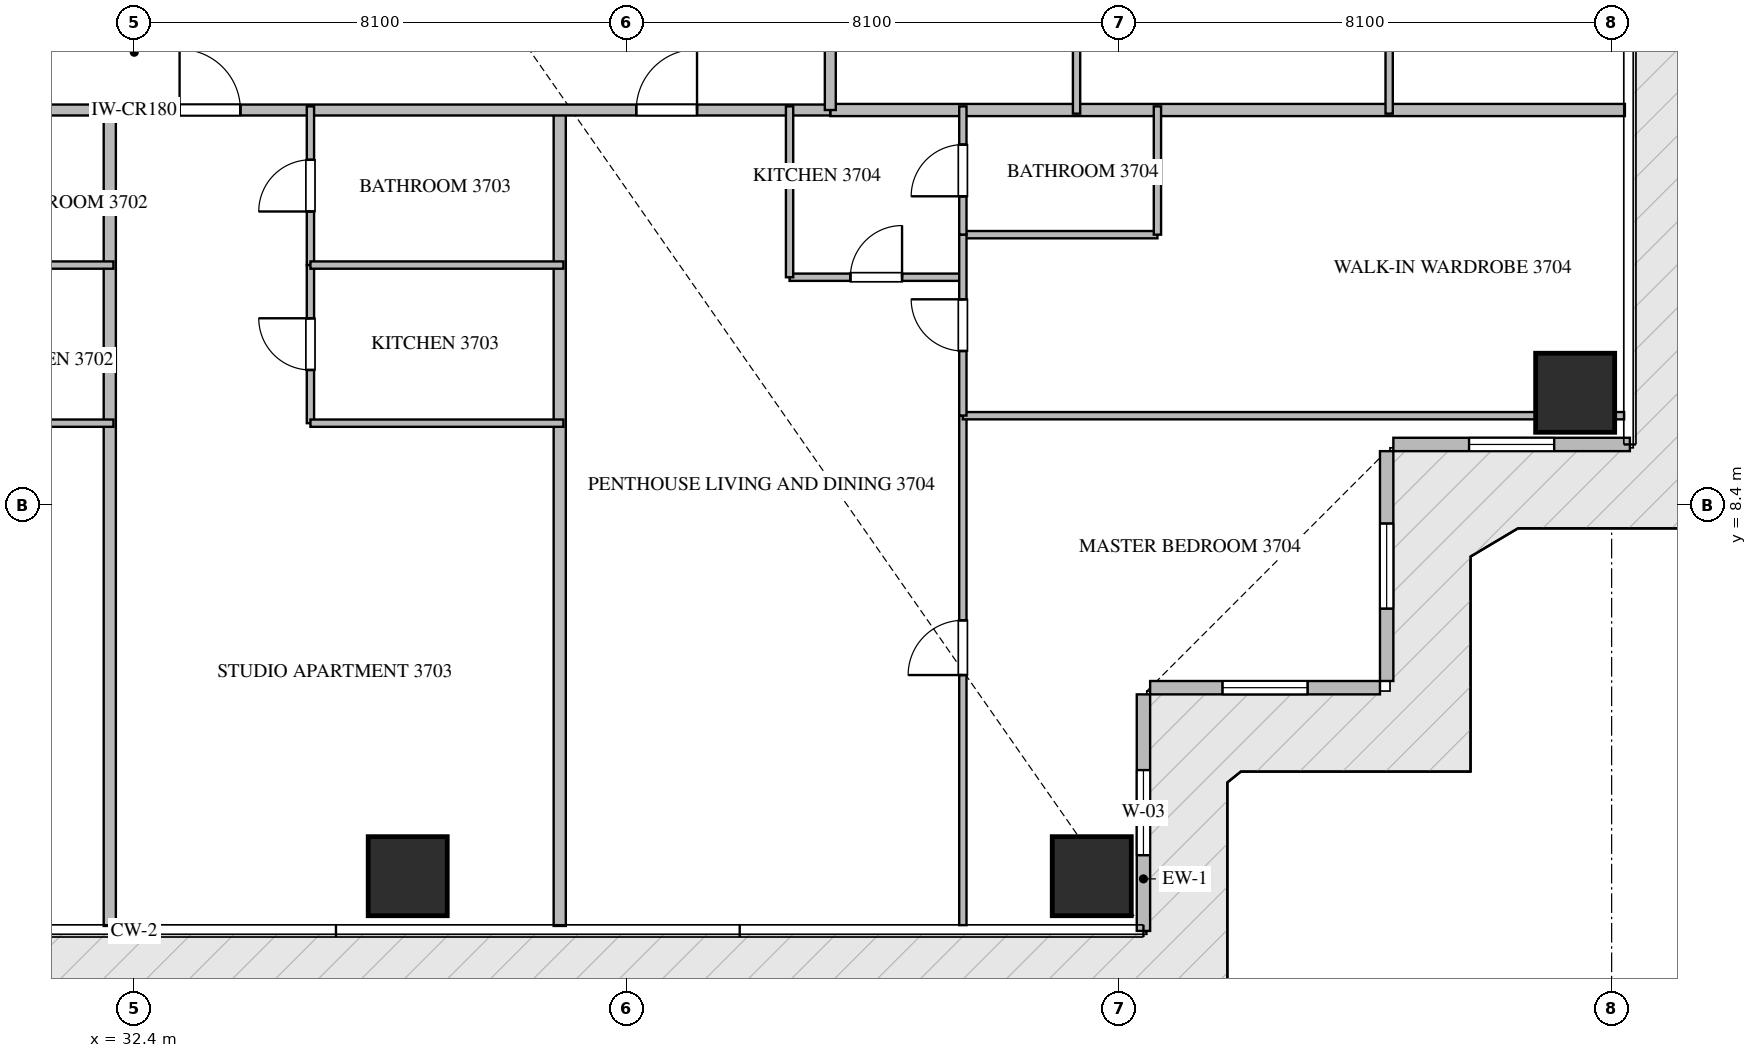
"""IFC4 building model, lengths in metres.
Left out: names, types, materials, properties, quantities, classifications, styles, units other than length and angle.
Written with IfcOpenShell. Run it as: python <this file> out.ifc"""

import sys

from ifc_helpers import new_model, si_unit, direction, frame, frame_2d, origin, origin_2d, place, context, subcontext, project, spatial, rectangle, extrude, source, transform, mapped, element, fill, save


model = new_model("IFC4")
c1 = context("Model", 3, precision=1e-05, world=origin(), true_north=direction((0.0, 1.0)))
c2 = subcontext(c1, "Body", "Model", "MODEL_VIEW")
j1 = project(units=[si_unit("LENGTHUNIT", "METRE"), si_unit("PLANEANGLEUNIT", "RADIAN")], contexts=[c1])
p1 = place(None, origin())
s1 = spatial("IfcSite", under=j1, at=p1, CompositionType="ELEMENT")
p2 = place(p1, origin())
s2 = spatial("IfcBuilding", under=s1, at=p2, CompositionType="ELEMENT")
p3 = place(p2, frame((0.0, 0.0, 150.15)))
s3 = spatial("IfcBuildingStorey", under=s2, at=p3, CompositionType="ELEMENT", Elevation=150.15)
m1 = source(origin(), c2, "Body", "SweptSolid", [
    extrude(rectangle(XDim=1.3, YDim=1.3, at=origin_2d()), origin(), (0.0, 0.0, 1.0), 3.75),
])
for number, where, z_axis, x_axis in (
    (1, (36.9, 2.3, -0.26), (0.0, 0.0, 1.0), (1.0, 0.0, 0.0)),
    (2, (48.15, 2.3, -0.26), (0.0, 0.0, 1.0), (1.0, 0.0, 0.0)),
    (3, (56.1, 10.25, -0.26), (0.0, 0.0, 1.0), (1.0, 0.0, 0.0)),
):
    element("IfcColumn", number, at=place(p3, frame(where, z_axis=z_axis, x_axis=x_axis)), inside=s3, PredefinedType="COLUMN", context=c2, shape_type="MappedRepresentation", body=[
        mapped(m1, transform((0.0, 0.0, 0.0), scale=1.0)),
    ])
p4 = place(p3, frame((49.0, 1.4, 0.0), z_axis=(0.0, 0.0, 1.0), x_axis=(0.0, 1.0, 0.0)))
e4 = element("IfcWall", 4, at=p4, inside=s3, PredefinedType="ELEMENTEDWALL", context=c2, shape_type="SweptSolid", body=[
    extrude(rectangle(XDim=3.89, YDim=0.22, at=frame_2d((1.945, 0.0))), origin(), (0.0, 0.0, 1.0), 3.475),
])
p5 = place(p4, frame((1.245, 0.0, 0.65)))
e5 = element("IfcOpeningElement", 5, at=p5, cuts=e4, PredefinedType="OPENING", context=c2, shape_type="SweptSolid", body=[
    extrude(rectangle(XDim=1.4, YDim=2.05, at=frame_2d((0.7, 1.025))), frame((0.0, 0.12, 0.0), z_axis=(0.0, -1.0, 0.0), x_axis=(1.0, 0.0, 0.0)), (0.0, 0.0, 1.0), 0.24),
])
p6 = place(p3, frame((49.11, 5.4, 0.0), z_axis=(0.0, 0.0, 1.0), x_axis=(1.0, 0.0, 0.0)))
e6 = element("IfcWall", 6, at=p6, inside=s3, PredefinedType="ELEMENTEDWALL", context=c2, shape_type="SweptSolid", body=[
    extrude(rectangle(XDim=3.78, YDim=0.22, at=frame_2d((1.89, 0.0))), origin(), (0.0, 0.0, 1.0), 3.475),
])
p7 = place(p6, frame((1.19, 0.0, 0.65)))
e7 = element("IfcOpeningElement", 7, at=p7, cuts=e6, PredefinedType="OPENING", context=c2, shape_type="SweptSolid", body=[
    extrude(rectangle(XDim=1.4, YDim=2.05, at=frame_2d((0.7, 1.025))), frame((0.0, 0.12, 0.0), z_axis=(0.0, -1.0, 0.0), x_axis=(1.0, 0.0, 0.0)), (0.0, 0.0, 1.0), 0.24),
])
p8 = place(p3, frame((53.0, 5.51, 0.0), z_axis=(0.0, 0.0, 1.0), x_axis=(0.0, 1.0, 0.0)))
e8 = element("IfcWall", 8, at=p8, inside=s3, PredefinedType="ELEMENTEDWALL", context=c2, shape_type="SweptSolid", body=[
    extrude(rectangle(XDim=3.78, YDim=0.22, at=frame_2d((1.89, 0.0))), origin(), (0.0, 0.0, 1.0), 3.475),
])
p9 = place(p8, frame((1.19, 0.0, 0.65)))
e9 = element("IfcOpeningElement", 9, at=p9, cuts=e8, PredefinedType="OPENING", context=c2, shape_type="SweptSolid", body=[
    extrude(rectangle(XDim=1.4, YDim=2.05, at=frame_2d((0.7, 1.025))), frame((0.0, 0.12, 0.0), z_axis=(0.0, -1.0, 0.0), x_axis=(1.0, 0.0, 0.0)), (0.0, 0.0, 1.0), 0.24),
])
p10 = place(p3, frame((53.11, 9.4, 0.0), z_axis=(0.0, 0.0, 1.0), x_axis=(1.0, 0.0, 0.0)))
e10 = element("IfcWall", 10, at=p10, inside=s3, PredefinedType="ELEMENTEDWALL", context=c2, shape_type="SweptSolid", body=[
    extrude(rectangle(XDim=3.89, YDim=0.22, at=frame_2d((1.945, 0.0))), origin(), (0.0, 0.0, 1.0), 3.475),
])
p11 = place(p10, frame((1.245, 0.0, 0.65)))
e11 = element("IfcOpeningElement", 11, at=p11, cuts=e10, PredefinedType="OPENING", context=c2, shape_type="SweptSolid", body=[
    extrude(rectangle(XDim=1.4, YDim=2.05, at=frame_2d((0.7, 1.025))), frame((0.0, 0.12, 0.0), z_axis=(0.0, -1.0, 0.0), x_axis=(1.0, 0.0, 0.0)), (0.0, 0.0, 1.0), 0.24),
])
for number, where, z_axis, x_axis in (
    (12, (32.0, 1.482, 0.0), (0.0, 0.0, 1.0), (0.0, 1.0, 0.0)),
    (13, (39.4, 1.482, 0.0), (0.0, 0.0, 1.0), (0.0, 1.0, 0.0)),
):
    element("IfcWall", number, at=place(p3, frame(where, z_axis=z_axis, x_axis=x_axis)), inside=s3, PredefinedType="PARTITIONING", context=c2, shape_type="SweptSolid", body=[
        extrude(rectangle(XDim=13.418, YDim=0.2, at=frame_2d((6.709, 0.0))), origin(), (0.0, 0.0, 1.0), 3.49),
    ])
p12 = place(p3, frame((43.85, 14.9, 0.0), z_axis=(0.0, 0.0, 1.0), x_axis=(1.0, 0.0, 0.0)))
e14 = element("IfcWall", 14, at=p12, inside=s3, PredefinedType="PARTITIONING", context=c2, shape_type="SweptSolid", body=[
    extrude(rectangle(XDim=13.068, YDim=0.2, at=frame_2d((6.534, 0.0))), origin(), (0.0, 0.0, 1.0), 3.49),
])
p13 = place(p3, frame((20.952, 14.9, 0.0), z_axis=(0.0, 0.0, 1.0), x_axis=(1.0, 0.0, 0.0)))
e15 = element("IfcWall", 15, at=p13, inside=s3, PredefinedType="PARTITIONING", context=c2, shape_type="SweptSolid", body=[
    extrude(rectangle(XDim=22.896, YDim=0.18, at=frame_2d((11.448, 0.0))), origin(), (0.0, 0.0, 1.0), 3.49),
])
p14 = place(p13, frame((2.19, 0.0, 0.0)))
e16 = element("IfcOpeningElement", 16, at=p14, cuts=e15, PredefinedType="OPENING", context=c2, shape_type="SweptSolid", body=[
    extrude(rectangle(XDim=1.0, YDim=2.15, at=frame_2d((0.5, 1.075))), frame((0.0, 0.1, 0.0), z_axis=(0.0, -1.0, 0.0), x_axis=(1.0, 0.0, 0.0)), (0.0, 0.0, 1.0), 0.2),
])
p15 = place(p13, frame((5.802, 0.0, 0.0)))
e17 = element("IfcOpeningElement", 17, at=p15, cuts=e15, PredefinedType="OPENING", context=c2, shape_type="SweptSolid", body=[
    extrude(rectangle(XDim=1.0, YDim=2.15, at=frame_2d((0.5, 1.075))), frame((0.0, 0.1, 0.0), z_axis=(0.0, -1.0, 0.0), x_axis=(1.0, 0.0, 0.0)), (0.0, 0.0, 1.0), 0.2),
])
p16 = place(p13, frame((12.196, 0.0, 0.0)))
e18 = element("IfcOpeningElement", 18, at=p16, cuts=e15, PredefinedType="OPENING", context=c2, shape_type="SweptSolid", body=[
    extrude(rectangle(XDim=1.0, YDim=2.15, at=frame_2d((0.5, 1.075))), frame((0.0, 0.1, 0.0), z_axis=(0.0, -1.0, 0.0), x_axis=(1.0, 0.0, 0.0)), (0.0, 0.0, 1.0), 0.2),
])
p17 = place(p13, frame((19.706, 0.0, 0.0)))
e19 = element("IfcOpeningElement", 19, at=p17, cuts=e15, PredefinedType="OPENING", context=c2, shape_type="SweptSolid", body=[
    extrude(rectangle(XDim=1.0, YDim=2.15, at=frame_2d((0.5, 1.075))), frame((0.0, 0.1, 0.0), z_axis=(0.0, -1.0, 0.0), x_axis=(1.0, 0.0, 0.0)), (0.0, 0.0, 1.0), 0.2),
])
p18 = place(p3, frame((43.85, 14.9, 0.0), z_axis=(0.0, 0.0, 1.0), x_axis=(0.0, 1.0, 0.0)))
e20 = element("IfcWall", 20, at=p18, inside=s3, PredefinedType="PARTITIONING", context=c2, shape_type="SweptSolid", body=[
    extrude(rectangle(XDim=18.7, YDim=0.18, at=frame_2d((9.35, 0.0))), origin(), (0.0, 0.0, 1.0), 3.49),
])
p19 = place(p18, frame((14.603, 0.0, 0.0)))
e21 = element("IfcOpeningElement", 21, at=p19, cuts=e20, PredefinedType="OPENING", context=c2, shape_type="SweptSolid", body=[
    extrude(rectangle(XDim=1.0, YDim=2.15, at=frame_2d((0.5, 1.075))), frame((0.0, 0.1, 0.0), z_axis=(0.0, -1.0, 0.0), x_axis=(1.0, 0.0, 0.0)), (0.0, 0.0, 1.0), 0.2),
])
for number, where, z_axis, x_axis in (
    (22, (29.5, 12.35, 0.0), (0.0, 0.0, 1.0), (1.0, 0.0, 0.0)),
    (23, (29.5, 9.75, 0.0), (0.0, 0.0, 1.0), (1.0, 0.0, 0.0)),
):
    element("IfcWall", number, at=place(p3, frame(where, z_axis=z_axis, x_axis=x_axis)), inside=s3, PredefinedType="PARTITIONING", context=c2, shape_type="SweptSolid", body=[
        extrude(rectangle(XDim=2.56, YDim=0.12, at=frame_2d((1.28, 0.0))), origin(), (0.0, 0.0, 1.0), 3.49),
    ])
p20 = place(p3, frame((35.3, 9.75, 0.0), z_axis=(0.0, 0.0, 1.0), x_axis=(0.0, 1.0, 0.0)))
e24 = element("IfcWall", 24, at=p20, inside=s3, PredefinedType="PARTITIONING", context=c2, shape_type="SweptSolid", body=[
    extrude(rectangle(XDim=2.6, YDim=0.12, at=frame_2d((1.3, 0.0))), origin(), (0.0, 0.0, 1.0), 3.49),
])
p21 = place(p20, frame((0.875, 0.0, 0.0)))
e25 = element("IfcOpeningElement", 25, at=p21, cuts=e24, PredefinedType="OPENING", context=c2, shape_type="SweptSolid", body=[
    extrude(rectangle(XDim=0.85, YDim=2.1, at=frame_2d((0.425, 1.05))), frame((0.0, 0.07, 0.0), z_axis=(0.0, -1.0, 0.0), x_axis=(1.0, 0.0, 0.0)), (0.0, 0.0, 1.0), 0.14),
])
p22 = place(p3, frame((35.3, 12.352, 0.0), z_axis=(0.0, 0.0, 1.0), x_axis=(0.0, 1.0, 0.0)))
e26 = element("IfcWall", 26, at=p22, inside=s3, PredefinedType="PARTITIONING", context=c2, shape_type="SweptSolid", body=[
    extrude(rectangle(XDim=2.608, YDim=0.12, at=frame_2d((1.304, 0.0))), origin(), (0.0, 0.0, 1.0), 3.49),
])
p23 = place(p22, frame((0.879, 0.0, 0.0)))
e27 = element("IfcOpeningElement", 27, at=p23, cuts=e26, PredefinedType="OPENING", context=c2, shape_type="SweptSolid", body=[
    extrude(rectangle(XDim=0.85, YDim=2.1, at=frame_2d((0.425, 1.05))), frame((0.0, 0.07, 0.0), z_axis=(0.0, -1.0, 0.0), x_axis=(1.0, 0.0, 0.0)), (0.0, 0.0, 1.0), 0.14),
])
for number, where, z_axis, x_axis in (
    (28, (35.3, 12.35, 0.0), (0.0, 0.0, 1.0), (1.0, 0.0, 0.0)),
    (29, (35.3, 9.75, 0.0), (0.0, 0.0, 1.0), (1.0, 0.0, 0.0)),
):
    element("IfcWall", number, at=place(p3, frame(where, z_axis=z_axis, x_axis=x_axis)), inside=s3, PredefinedType="PARTITIONING", context=c2, shape_type="SweptSolid", body=[
        extrude(rectangle(XDim=4.16, YDim=0.12, at=frame_2d((2.08, 0.0))), origin(), (0.0, 0.0, 1.0), 3.49),
    ])
p24 = place(p3, frame((43.18, 12.15, 0.0), z_axis=(0.0, 0.0, 1.0), x_axis=(1.0, 0.0, 0.0)))
e30 = element("IfcWall", 30, at=p24, inside=s3, PredefinedType="PARTITIONING", context=c2, shape_type="SweptSolid", body=[
    extrude(rectangle(XDim=2.85, YDim=0.12, at=frame_2d((1.425, 0.0))), origin(), (0.0, 0.0, 1.0), 3.49),
])
p25 = place(p24, frame((1.0, 0.0, 0.0)))
e31 = element("IfcOpeningElement", 31, at=p25, cuts=e30, PredefinedType="OPENING", context=c2, shape_type="SweptSolid", body=[
    extrude(rectangle(XDim=0.85, YDim=2.1, at=frame_2d((0.425, 1.05))), frame((0.0, 0.07, 0.0), z_axis=(0.0, -1.0, 0.0), x_axis=(1.0, 0.0, 0.0)), (0.0, 0.0, 1.0), 0.14),
])
p26 = place(p3, frame((43.18, 12.15, 0.0), z_axis=(0.0, 0.0, 1.0), x_axis=(0.0, 1.0, 0.0)))
e32 = element("IfcWall", 32, at=p26, inside=s3, PredefinedType="PARTITIONING", context=c2, shape_type="SweptSolid", body=[
    extrude(rectangle(XDim=2.81, YDim=0.12, at=frame_2d((1.405, 0.0))), origin(), (0.0, 0.0, 1.0), 3.49),
])
p27 = place(p3, frame((46.03, 1.495, 0.0), z_axis=(0.0, 0.0, 1.0), x_axis=(0.0, 1.0, 0.0)))
e33 = element("IfcWall", 33, at=p27, inside=s3, PredefinedType="PARTITIONING", context=c2, shape_type="SweptSolid", body=[
    extrude(rectangle(XDim=8.378, YDim=0.12, at=frame_2d((4.189, 0.0))), origin(), (0.0, 0.0, 1.0), 3.49),
])
p28 = place(p27, frame((4.113, 0.0, 0.0)))
e34 = element("IfcOpeningElement", 34, at=p28, cuts=e33, PredefinedType="OPENING", context=c2, shape_type="SweptSolid", body=[
    extrude(rectangle(XDim=0.9, YDim=2.1, at=frame_2d((0.45, 1.05))), frame((0.0, 0.07, 0.0), z_axis=(0.0, -1.0, 0.0), x_axis=(1.0, 0.0, 0.0)), (0.0, 0.0, 1.0), 0.14),
])
p29 = place(p3, frame((46.03, 9.873, 0.0), z_axis=(0.0, 0.0, 1.0), x_axis=(1.0, 0.0, 0.0)))
e35 = element("IfcWall", 35, at=p29, inside=s3, PredefinedType="PARTITIONING", context=c2, shape_type="SweptSolid", body=[
    extrude(rectangle(XDim=10.875, YDim=0.12, at=frame_2d((5.438, 0.0))), origin(), (0.0, 0.0, 1.0), 3.49),
])
p30 = place(p3, frame((46.03, 12.85, 0.0), z_axis=(0.0, 0.0, 1.0), x_axis=(1.0, 0.0, 0.0)))
e36 = element("IfcWall", 36, at=p30, inside=s3, PredefinedType="PARTITIONING", context=c2, shape_type="SweptSolid", body=[
    extrude(rectangle(XDim=3.2, YDim=0.12, at=frame_2d((1.6, 0.0))), origin(), (0.0, 0.0, 1.0), 3.49),
])
p31 = place(p3, frame((49.23, 12.85, 0.0), z_axis=(0.0, 0.0, 1.0), x_axis=(0.0, 1.0, 0.0)))
e37 = element("IfcWall", 37, at=p31, inside=s3, PredefinedType="PARTITIONING", context=c2, shape_type="SweptSolid", body=[
    extrude(rectangle(XDim=2.11, YDim=0.12, at=frame_2d((1.055, 0.0))), origin(), (0.0, 0.0, 1.0), 3.49),
])
p32 = place(p3, frame((46.03, 9.875, 0.0), z_axis=(0.0, 0.0, 1.0), x_axis=(0.0, 1.0, 0.0)))
e38 = element("IfcWall", 38, at=p32, inside=s3, PredefinedType="PARTITIONING", context=c2, shape_type="SweptSolid", body=[
    extrude(rectangle(XDim=2.975, YDim=0.12, at=frame_2d((1.488, 0.0))), origin(), (0.0, 0.0, 1.0), 3.49),
])
p33 = place(p32, frame((1.062, 0.0, 0.0)))
e39 = element("IfcOpeningElement", 39, at=p33, cuts=e38, PredefinedType="OPENING", context=c2, shape_type="SweptSolid", body=[
    extrude(rectangle(XDim=0.85, YDim=2.1, at=frame_2d((0.425, 1.05))), frame((0.0, 0.07, 0.0), z_axis=(0.0, -1.0, 0.0), x_axis=(1.0, 0.0, 0.0)), (0.0, 0.0, 1.0), 0.14),
])
p34 = place(p3, frame((46.03, 12.852, 0.0), z_axis=(0.0, 0.0, 1.0), x_axis=(0.0, 1.0, 0.0)))
e40 = element("IfcWall", 40, at=p34, inside=s3, PredefinedType="PARTITIONING", context=c2, shape_type="SweptSolid", body=[
    extrude(rectangle(XDim=2.108, YDim=0.12, at=frame_2d((1.054, 0.0))), origin(), (0.0, 0.0, 1.0), 3.49),
])
p35 = place(p34, frame((0.629, 0.0, 0.0)))
e41 = element("IfcOpeningElement", 41, at=p35, cuts=e40, PredefinedType="OPENING", context=c2, shape_type="SweptSolid", body=[
    extrude(rectangle(XDim=0.85, YDim=2.1, at=frame_2d((0.425, 1.05))), frame((0.0, 0.07, 0.0), z_axis=(0.0, -1.0, 0.0), x_axis=(1.0, 0.0, 0.0)), (0.0, 0.0, 1.0), 0.14),
])
p36 = place(p3, frame((53.041, 14.84, 0.0), z_axis=(0.0, 0.0, 1.0), x_axis=(0.0, 1.0, 0.0)))
e42 = element("IfcWall", 42, at=p36, inside=s3, PredefinedType="PARTITIONING", context=c2, shape_type="SweptSolid", body=[
    extrude(rectangle(XDim=11.65, YDim=0.12, at=frame_2d((5.825, 0.0))), origin(), (0.0, 0.0, 1.0), 3.49),
])
p37 = place(p3, frame((47.9, 14.84, 0.0), z_axis=(0.0, 0.0, 1.0), x_axis=(0.0, 1.0, 0.0)))
e43 = element("IfcWall", 43, at=p37, inside=s3, PredefinedType="PARTITIONING", context=c2, shape_type="SweptSolid", body=[
    extrude(rectangle(XDim=11.65, YDim=0.12, at=frame_2d((5.825, 0.0))), origin(), (0.0, 0.0, 1.0), 2.972),
])
m2 = source(origin(), c2, "Body", "SweptSolid", [
    extrude(rectangle(XDim=1.4, YDim=2.05, at=frame_2d((0.7, 1.025))), frame((0.0, 0.03, 0.0), z_axis=(0.0, -1.0, 0.0), x_axis=(1.0, 0.0, 0.0)), (0.0, 0.0, 1.0), 0.06),
])
p38 = place(p5, origin())
e44 = element("IfcWindow", 44, at=p38, inside=s3, PartitioningType="SINGLE_PANEL", PredefinedType="WINDOW", context=c2, shape_type="MappedRepresentation", body=[
    mapped(m2, transform((0.0, 0.0, 0.0), scale=1.0)),
])
fill(e5, e44)
p39 = place(p7, origin())
e45 = element("IfcWindow", 45, at=p39, inside=s3, PartitioningType="SINGLE_PANEL", PredefinedType="WINDOW", context=c2, shape_type="MappedRepresentation", body=[
    mapped(m2, transform((0.0, 0.0, 0.0), scale=1.0)),
])
fill(e7, e45)
p40 = place(p9, origin())
e46 = element("IfcWindow", 46, at=p40, inside=s3, PartitioningType="SINGLE_PANEL", PredefinedType="WINDOW", context=c2, shape_type="MappedRepresentation", body=[
    mapped(m2, transform((0.0, 0.0, 0.0), scale=1.0)),
])
fill(e9, e46)
p41 = place(p11, origin())
e47 = element("IfcWindow", 47, at=p41, inside=s3, PartitioningType="SINGLE_PANEL", PredefinedType="WINDOW", context=c2, shape_type="MappedRepresentation", body=[
    mapped(m2, transform((0.0, 0.0, 0.0), scale=1.0)),
])
fill(e11, e47)
m3 = source(origin(), c2, "Body", "SweptSolid", [
    extrude(rectangle(XDim=1.0, YDim=2.15, at=frame_2d((0.5, 1.075))), frame((0.0, 0.025, 0.0), z_axis=(0.0, -1.0, 0.0), x_axis=(1.0, 0.0, 0.0)), (0.0, 0.0, 1.0), 0.05),
])
p42 = place(p16, origin())
e48 = element("IfcDoor", 48, at=p42, inside=s3, OperationType="SINGLE_SWING_LEFT", PredefinedType="DOOR", context=c2, shape_type="MappedRepresentation", body=[
    mapped(m3, transform((0.0, 0.0, 0.0), scale=1.0)),
])
fill(e18, e48)
p43 = place(p17, origin())
e49 = element("IfcDoor", 49, at=p43, inside=s3, OperationType="SINGLE_SWING_RIGHT", PredefinedType="DOOR", context=c2, shape_type="MappedRepresentation", body=[
    mapped(m3, transform((0.0, 0.0, 0.0), scale=1.0)),
])
fill(e19, e49)
m4 = source(origin(), c2, "Body", "SweptSolid", [
    extrude(rectangle(XDim=0.85, YDim=2.1, at=frame_2d((0.425, 1.05))), frame((0.0, 0.025, 0.0), z_axis=(0.0, -1.0, 0.0), x_axis=(1.0, 0.0, 0.0)), (0.0, 0.0, 1.0), 0.05),
])
p44 = place(p21, origin())
e50 = element("IfcDoor", 50, at=p44, inside=s3, OperationType="SINGLE_SWING_RIGHT", PredefinedType="DOOR", context=c2, shape_type="MappedRepresentation", body=[
    mapped(m4, transform((0.0, 0.0, 0.0), scale=1.0)),
])
fill(e25, e50)
p45 = place(p23, origin())
e51 = element("IfcDoor", 51, at=p45, inside=s3, OperationType="SINGLE_SWING_LEFT", PredefinedType="DOOR", context=c2, shape_type="MappedRepresentation", body=[
    mapped(m4, transform((0.0, 0.0, 0.0), scale=1.0)),
])
fill(e27, e51)
p46 = place(p25, origin())
e52 = element("IfcDoor", 52, at=p46, inside=s3, OperationType="SINGLE_SWING_RIGHT", PredefinedType="DOOR", context=c2, shape_type="MappedRepresentation", body=[
    mapped(m4, transform((0.0, 0.0, 0.0), scale=1.0)),
])
fill(e31, e52)
m5 = source(origin(), c2, "Body", "SweptSolid", [
    extrude(rectangle(XDim=0.9, YDim=2.1, at=frame_2d((0.45, 1.05))), frame((0.0, 0.025, 0.0), z_axis=(0.0, -1.0, 0.0), x_axis=(1.0, 0.0, 0.0)), (0.0, 0.0, 1.0), 0.05),
])
p47 = place(p28, origin())
e53 = element("IfcDoor", 53, at=p47, inside=s3, OperationType="SINGLE_SWING_LEFT", PredefinedType="DOOR", context=c2, shape_type="MappedRepresentation", body=[
    mapped(m5, transform((0.0, 0.0, 0.0), scale=1.0)),
])
fill(e34, e53)
p48 = place(p33, origin())
e54 = element("IfcDoor", 54, at=p48, inside=s3, OperationType="SINGLE_SWING_RIGHT", PredefinedType="DOOR", context=c2, shape_type="MappedRepresentation", body=[
    mapped(m4, transform((0.0, 0.0, 0.0), scale=1.0)),
])
fill(e39, e54)
p49 = place(p35, origin())
e55 = element("IfcDoor", 55, at=p49, inside=s3, OperationType="SINGLE_SWING_LEFT", PredefinedType="DOOR", context=c2, shape_type="MappedRepresentation", body=[
    mapped(m4, transform((0.0, 0.0, 0.0), scale=1.0)),
])
fill(e41, e55)
save(model, sys.argv[1])
